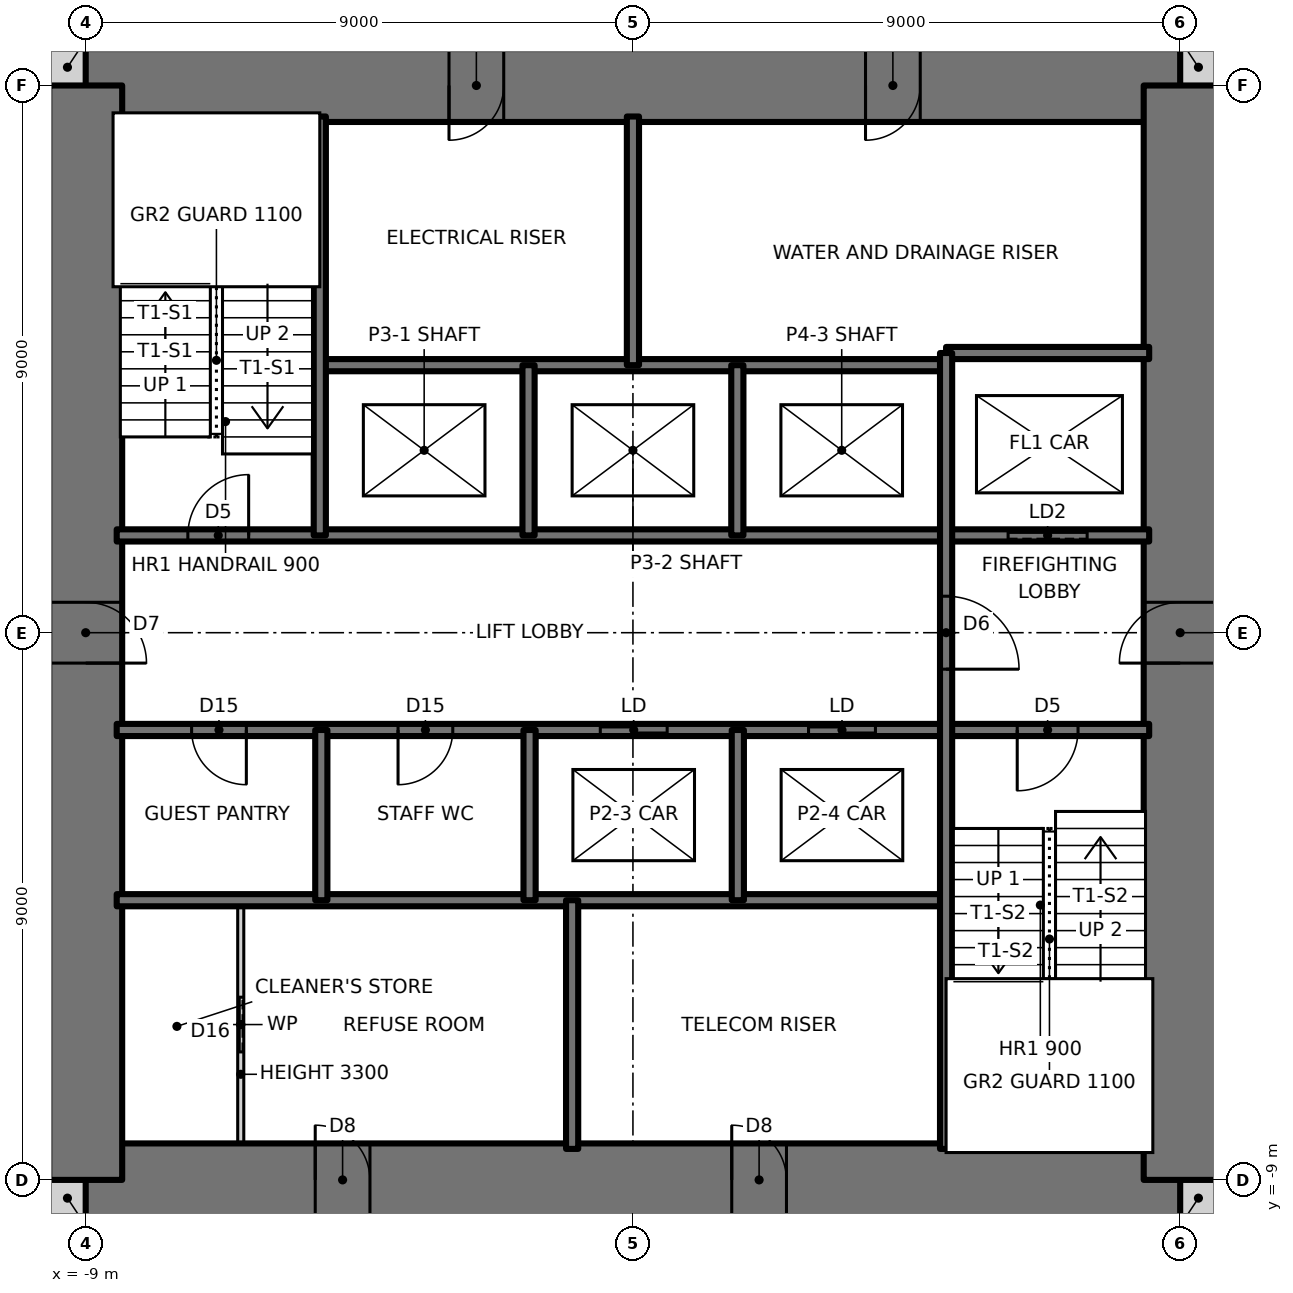
"""IFC4 building model, lengths in metres.
Left out: names, types, materials, properties, quantities, classifications, styles, units other than length and angle.
Written with IfcOpenShell. Run it as: python <this file> out.ifc"""

import sys

from ifc_helpers import new_model, si_unit, direction, frame, frame_2d, origin, place, context, subcontext, project, spatial, rectangle, extrude, element, fill, save


model = new_model("IFC4")
c1 = context("Model", 3, precision=1e-05, world=origin(), true_north=direction((0.0, 1.0)))
c2 = subcontext(c1, "Body", "Model", "MODEL_VIEW")
j1 = project(units=[si_unit("LENGTHUNIT", "METRE"), si_unit("PLANEANGLEUNIT", "RADIAN")], contexts=[c1])
p1 = place(None, origin())
s1 = spatial("IfcSite", under=j1, at=p1, CompositionType="ELEMENT")
p2 = place(p1, origin())
s2 = spatial("IfcBuilding", under=s1, at=p2, CompositionType="ELEMENT")
p3 = place(p2, frame((0.0, 0.0, 133.0)))
s3 = spatial("IfcBuildingStorey", under=s2, at=p3, CompositionType="ELEMENT", Elevation=133.0)
for number, where, z_axis, x_axis in (
    (1, (-9.6, -9.3, 0.0), (0.0, 0.0, 1.0), (1.0, 0.0, 0.0)),
    (2, (9.0, -9.3, 0.0), (0.0, 0.0, 1.0), (1.0, 0.0, 0.0)),
    (3, (9.0, 9.3, 0.0), (0.0, 0.0, 1.0), (1.0, 0.0, 0.0)),
    (4, (-9.6, 9.3, 0.0), (0.0, 0.0, 1.0), (1.0, 0.0, 0.0)),
):
    element("IfcWall", number, at=place(p3, frame(where, z_axis=z_axis, x_axis=x_axis)), inside=s3, PredefinedType="SOLIDWALL", context=c2, shape_type="SweptSolid", body=[
        extrude(rectangle(XDim=0.6, YDim=0.6, at=frame_2d((0.3, 0.0))), origin(), (0.0, 0.0, 1.0), 3.5),
    ])
p4 = place(p3, frame((-9.0, -9.0, 0.0), z_axis=(0.0, 0.0, 1.0), x_axis=(1.0, 0.0, 0.0)))
e5 = element("IfcWall", 5, at=p4, inside=s3, PredefinedType="SHEAR", context=c2, shape_type="SweptSolid", body=[
    extrude(rectangle(XDim=18.0, YDim=1.2, at=frame_2d((9.0, 0.0))), origin(), (0.0, 0.0, 1.0), 3.5),
])
p5 = place(p4, frame((3.775, 0.0, 0.0)))
e6 = element("IfcOpeningElement", 6, at=p5, cuts=e5, PredefinedType="OPENING", context=c2, shape_type="SweptSolid", body=[
    extrude(rectangle(XDim=0.9, YDim=2.1, at=frame_2d((0.45, 1.05))), frame((0.0, 0.61, 0.0), z_axis=(0.0, -1.0, 0.0), x_axis=(1.0, 0.0, 0.0)), (0.0, 0.0, 1.0), 1.22),
])
p6 = place(p4, frame((10.625, 0.0, 0.0)))
e7 = element("IfcOpeningElement", 7, at=p6, cuts=e5, PredefinedType="OPENING", context=c2, shape_type="SweptSolid", body=[
    extrude(rectangle(XDim=0.9, YDim=2.1, at=frame_2d((0.45, 1.05))), frame((0.0, 0.61, 0.0), z_axis=(0.0, -1.0, 0.0), x_axis=(1.0, 0.0, 0.0)), (0.0, 0.0, 1.0), 1.22),
])
p7 = place(p3, frame((9.0, 9.0, 0.0), z_axis=(0.0, 0.0, 1.0), x_axis=(-1.0, 0.0, 0.0)))
e8 = element("IfcWall", 8, at=p7, inside=s3, PredefinedType="SHEAR", context=c2, shape_type="SweptSolid", body=[
    extrude(rectangle(XDim=18.0, YDim=1.2, at=frame_2d((9.0, 0.0))), origin(), (0.0, 0.0, 1.0), 3.5),
])
p8 = place(p7, frame((11.125, 0.0, 0.0)))
e9 = element("IfcOpeningElement", 9, at=p8, cuts=e8, PredefinedType="OPENING", context=c2, shape_type="SweptSolid", body=[
    extrude(rectangle(XDim=0.9, YDim=2.1, at=frame_2d((0.45, 1.05))), frame((0.0, 0.61, 0.0), z_axis=(0.0, -1.0, 0.0), x_axis=(1.0, 0.0, 0.0)), (0.0, 0.0, 1.0), 1.22),
])
p9 = place(p7, frame((4.275, 0.0, 0.0)))
e10 = element("IfcOpeningElement", 10, at=p9, cuts=e8, PredefinedType="OPENING", context=c2, shape_type="SweptSolid", body=[
    extrude(rectangle(XDim=0.9, YDim=2.1, at=frame_2d((0.45, 1.05))), frame((0.0, 0.61, 0.0), z_axis=(0.0, -1.0, 0.0), x_axis=(1.0, 0.0, 0.0)), (0.0, 0.0, 1.0), 1.22),
])
p10 = place(p3, frame((9.0, -9.0, 0.0), z_axis=(0.0, 0.0, 1.0), x_axis=(0.0, 1.0, 0.0)))
e11 = element("IfcWall", 11, at=p10, inside=s3, PredefinedType="SHEAR", context=c2, shape_type="SweptSolid", body=[
    extrude(rectangle(XDim=18.0, YDim=1.2, at=frame_2d((9.0, 0.0))), origin(), (0.0, 0.0, 1.0), 3.5),
])
p11 = place(p10, frame((8.5, 0.0, 0.0)))
e12 = element("IfcOpeningElement", 12, at=p11, cuts=e11, PredefinedType="OPENING", context=c2, shape_type="SweptSolid", body=[
    extrude(rectangle(XDim=1.0, YDim=2.1, at=frame_2d((0.5, 1.05))), frame((0.0, 0.61, 0.0), z_axis=(0.0, -1.0, 0.0), x_axis=(1.0, 0.0, 0.0)), (0.0, 0.0, 1.0), 1.22),
])
p12 = place(p3, frame((-9.0, 9.0, 0.0), z_axis=(0.0, 0.0, 1.0), x_axis=(0.0, -1.0, 0.0)))
e13 = element("IfcWall", 13, at=p12, inside=s3, PredefinedType="SHEAR", context=c2, shape_type="SweptSolid", body=[
    extrude(rectangle(XDim=18.0, YDim=1.2, at=frame_2d((9.0, 0.0))), origin(), (0.0, 0.0, 1.0), 3.5),
])
p13 = place(p12, frame((8.5, 0.0, 0.0)))
e14 = element("IfcOpeningElement", 14, at=p13, cuts=e13, PredefinedType="OPENING", context=c2, shape_type="SweptSolid", body=[
    extrude(rectangle(XDim=1.0, YDim=2.1, at=frame_2d((0.5, 1.05))), frame((0.0, 0.61, 0.0), z_axis=(0.0, -1.0, 0.0), x_axis=(1.0, 0.0, 0.0)), (0.0, 0.0, 1.0), 1.22),
])
p14 = place(p3, frame((-8.49, -4.4, 0.0), z_axis=(0.0, 0.0, 1.0), x_axis=(1.0, 0.0, 0.0)))
e15 = element("IfcWall", 15, at=p14, inside=s3, PredefinedType="SOLIDWALL", context=c2, shape_type="SweptSolid", body=[
    extrude(rectangle(XDim=13.64, YDim=0.2, at=frame_2d((6.82, 0.0))), origin(), (0.0, 0.0, 1.0), 3.5),
])
p15 = place(p3, frame((-8.49, -1.6, 0.0), z_axis=(0.0, 0.0, 1.0), x_axis=(1.0, 0.0, 0.0)))
e16 = element("IfcWall", 16, at=p15, inside=s3, PredefinedType="SOLIDWALL", context=c2, shape_type="SweptSolid", body=[
    extrude(rectangle(XDim=16.98, YDim=0.2, at=frame_2d((8.49, 0.0))), origin(), (0.0, 0.0, 1.0), 3.5),
])
p16 = place(p15, frame((14.81, 0.0, 0.0)))
e17 = element("IfcOpeningElement", 17, at=p16, cuts=e16, PredefinedType="OPENING", context=c2, shape_type="SweptSolid", body=[
    extrude(rectangle(XDim=1.0, YDim=2.1, at=frame_2d((0.5, 1.05))), frame((0.0, 0.11, 0.0), z_axis=(0.0, -1.0, 0.0), x_axis=(1.0, 0.0, 0.0)), (0.0, 0.0, 1.0), 0.22),
])
p17 = place(p15, frame((1.232, 0.0, 0.0)))
e18 = element("IfcOpeningElement", 18, at=p17, cuts=e16, PredefinedType="OPENING", context=c2, shape_type="SweptSolid", body=[
    extrude(rectangle(XDim=0.9, YDim=2.1, at=frame_2d((0.45, 1.05))), frame((0.0, 0.11, 0.0), z_axis=(0.0, -1.0, 0.0), x_axis=(1.0, 0.0, 0.0)), (0.0, 0.0, 1.0), 0.22),
])
p18 = place(p15, frame((4.627, 0.0, 0.0)))
e19 = element("IfcOpeningElement", 19, at=p18, cuts=e16, PredefinedType="OPENING", context=c2, shape_type="SweptSolid", body=[
    extrude(rectangle(XDim=0.9, YDim=2.1, at=frame_2d((0.45, 1.05))), frame((0.0, 0.11, 0.0), z_axis=(0.0, -1.0, 0.0), x_axis=(1.0, 0.0, 0.0)), (0.0, 0.0, 1.0), 0.22),
])
p19 = place(p15, frame((7.953, 0.0, 0.0)))
e20 = element("IfcOpeningElement", 20, at=p19, cuts=e16, PredefinedType="OPENING", context=c2, shape_type="SweptSolid", body=[
    extrude(rectangle(XDim=1.1, YDim=2.1, at=frame_2d((0.55, 1.05))), frame((0.0, 0.11, 0.0), z_axis=(0.0, -1.0, 0.0), x_axis=(1.0, 0.0, 0.0)), (0.0, 0.0, 1.0), 0.22),
])
p20 = place(p15, frame((11.378, 0.0, 0.0)))
e21 = element("IfcOpeningElement", 21, at=p20, cuts=e16, PredefinedType="OPENING", context=c2, shape_type="SweptSolid", body=[
    extrude(rectangle(XDim=1.1, YDim=2.1, at=frame_2d((0.55, 1.05))), frame((0.0, 0.11, 0.0), z_axis=(0.0, -1.0, 0.0), x_axis=(1.0, 0.0, 0.0)), (0.0, 0.0, 1.0), 0.22),
])
p21 = place(p3, frame((-8.49, 1.6, 0.0), z_axis=(0.0, 0.0, 1.0), x_axis=(1.0, 0.0, 0.0)))
e22 = element("IfcWall", 22, at=p21, inside=s3, PredefinedType="SOLIDWALL", context=c2, shape_type="SweptSolid", body=[
    extrude(rectangle(XDim=16.98, YDim=0.2, at=frame_2d((8.49, 0.0))), origin(), (0.0, 0.0, 1.0), 3.5),
])
p22 = place(p21, frame((1.17, 0.0, 0.0)))
e23 = element("IfcOpeningElement", 23, at=p22, cuts=e22, PredefinedType="OPENING", context=c2, shape_type="SweptSolid", body=[
    extrude(rectangle(XDim=1.0, YDim=2.1, at=frame_2d((0.5, 1.05))), frame((0.0, 0.11, 0.0), z_axis=(0.0, -1.0, 0.0), x_axis=(1.0, 0.0, 0.0)), (0.0, 0.0, 1.0), 0.22),
])
p23 = place(p21, frame((14.66, 0.0, 0.0)))
e24 = element("IfcOpeningElement", 24, at=p23, cuts=e22, PredefinedType="OPENING", context=c2, shape_type="SweptSolid", body=[
    extrude(rectangle(XDim=1.3, YDim=2.1, at=frame_2d((0.65, 1.05))), frame((0.0, 0.11, 0.0), z_axis=(0.0, -1.0, 0.0), x_axis=(1.0, 0.0, 0.0)), (0.0, 0.0, 1.0), 0.22),
])
p24 = place(p3, frame((-5.15, 4.4, 0.0), z_axis=(0.0, 0.0, 1.0), x_axis=(1.0, 0.0, 0.0)))
e25 = element("IfcWall", 25, at=p24, inside=s3, PredefinedType="SOLIDWALL", context=c2, shape_type="SweptSolid", body=[
    extrude(rectangle(XDim=10.3, YDim=0.2, at=frame_2d((5.15, 0.0))), origin(), (0.0, 0.0, 1.0), 3.5),
])
p25 = place(p3, frame((5.15, 4.6, 0.0), z_axis=(0.0, 0.0, 1.0), x_axis=(1.0, 0.0, 0.0)))
e26 = element("IfcWall", 26, at=p25, inside=s3, PredefinedType="SOLIDWALL", context=c2, shape_type="SweptSolid", body=[
    extrude(rectangle(XDim=3.34, YDim=0.2, at=frame_2d((1.67, 0.0))), origin(), (0.0, 0.0, 1.0), 3.5),
])
p26 = place(p3, frame((5.15, -8.49, 0.0), z_axis=(0.0, 0.0, 1.0), x_axis=(0.0, 1.0, 0.0)))
e27 = element("IfcWall", 27, at=p26, inside=s3, PredefinedType="SOLIDWALL", context=c2, shape_type="SweptSolid", body=[
    extrude(rectangle(XDim=13.09, YDim=0.2, at=frame_2d((6.545, 0.0))), origin(), (0.0, 0.0, 1.0), 3.5),
])
p27 = place(p26, frame((7.89, 0.0, 0.0)))
e28 = element("IfcOpeningElement", 28, at=p27, cuts=e27, PredefinedType="OPENING", context=c2, shape_type="SweptSolid", body=[
    extrude(rectangle(XDim=1.2, YDim=2.1, at=frame_2d((0.6, 1.05))), frame((0.0, 0.11, 0.0), z_axis=(0.0, -1.0, 0.0), x_axis=(1.0, 0.0, 0.0)), (0.0, 0.0, 1.0), 0.22),
])
for number, where, z_axis, x_axis in (
    (29, (1.725, -4.4, 0.0), (0.0, 0.0, 1.0), (0.0, 1.0, 0.0)),
    (30, (1.717, 1.6, 0.0), (0.0, 0.0, 1.0), (0.0, 1.0, 0.0)),
):
    element("IfcWall", number, at=place(p3, frame(where, z_axis=z_axis, x_axis=x_axis)), inside=s3, PredefinedType="SOLIDWALL", context=c2, shape_type="SweptSolid", body=[
        extrude(rectangle(XDim=2.8, YDim=0.2, at=frame_2d((1.4, 0.0))), origin(), (0.0, 0.0, 1.0), 3.5),
    ])
for number, where, z_axis, x_axis in (
    (31, (0.0, 4.4, 0.0), (0.0, 0.0, 1.0), (0.0, 1.0, 0.0)),
    (32, (-1.0, -8.49, 0.0), (0.0, 0.0, 1.0), (0.0, 1.0, 0.0)),
):
    element("IfcWall", number, at=place(p3, frame(where, z_axis=z_axis, x_axis=x_axis)), inside=s3, PredefinedType="SOLIDWALL", context=c2, shape_type="SweptSolid", body=[
        extrude(rectangle(XDim=4.09, YDim=0.2, at=frame_2d((2.045, 0.0))), origin(), (0.0, 0.0, 1.0), 3.5),
    ])
for number, where, z_axis, x_axis in (
    (33, (-1.7, -4.4, 0.0), (0.0, 0.0, 1.0), (0.0, 1.0, 0.0)),
    (34, (-1.717, 1.6, 0.0), (0.0, 0.0, 1.0), (0.0, 1.0, 0.0)),
    (35, (-5.125, -4.4, 0.0), (0.0, 0.0, 1.0), (0.0, 1.0, 0.0)),
):
    element("IfcWall", number, at=place(p3, frame(where, z_axis=z_axis, x_axis=x_axis)), inside=s3, PredefinedType="SOLIDWALL", context=c2, shape_type="SweptSolid", body=[
        extrude(rectangle(XDim=2.8, YDim=0.2, at=frame_2d((1.4, 0.0))), origin(), (0.0, 0.0, 1.0), 3.5),
    ])
p28 = place(p3, frame((-5.15, 1.6, 0.0), z_axis=(0.0, 0.0, 1.0), x_axis=(0.0, 1.0, 0.0)))
e36 = element("IfcWall", 36, at=p28, inside=s3, PredefinedType="SOLIDWALL", context=c2, shape_type="SweptSolid", body=[
    extrude(rectangle(XDim=6.89, YDim=0.2, at=frame_2d((3.445, 0.0))), origin(), (0.0, 0.0, 1.0), 3.5),
])
p29 = place(p3, frame((-6.45, -8.49, 0.0), z_axis=(0.0, 0.0, 1.0), x_axis=(0.0, 1.0, 0.0)))
e37 = element("IfcWall", 37, at=p29, inside=s3, PredefinedType="PARTITIONING", context=c2, shape_type="SweptSolid", body=[
    extrude(rectangle(XDim=4.09, YDim=0.1, at=frame_2d((2.045, 0.0))), origin(), (0.0, 0.0, 1.0), 3.3),
])
p30 = place(p29, frame((1.595, 0.0, 0.0)))
e38 = element("IfcOpeningElement", 38, at=p30, cuts=e37, PredefinedType="OPENING", context=c2, shape_type="SweptSolid", body=[
    extrude(rectangle(XDim=0.9, YDim=2.1, at=frame_2d((0.45, 1.05))), frame((0.0, 0.06, 0.0), z_axis=(0.0, -1.0, 0.0), x_axis=(1.0, 0.0, 0.0)), (0.0, 0.0, 1.0), 0.12),
])
p31 = place(p22, origin())
e39 = element("IfcDoor", 39, at=p31, inside=s3, OperationType="SINGLE_SWING_RIGHT", PredefinedType="DOOR", context=c2, shape_type="SweptSolid", body=[
    extrude(rectangle(XDim=1.0, YDim=2.1, at=frame_2d((0.5, 1.05))), frame((0.0, 0.025, 0.0), z_axis=(0.0, -1.0, 0.0), x_axis=(1.0, 0.0, 0.0)), (0.0, 0.0, 1.0), 0.05),
])
fill(e23, e39)
p32 = place(p16, frame((1.0, 0.0, 0.0), z_axis=(0.0, 0.0, 1.0), x_axis=(-1.0, 0.0, 0.0)))
e40 = element("IfcDoor", 40, at=p32, inside=s3, OperationType="SINGLE_SWING_RIGHT", PredefinedType="DOOR", context=c2, shape_type="SweptSolid", body=[
    extrude(rectangle(XDim=1.0, YDim=2.1, at=frame_2d((0.5, 1.05))), frame((0.0, 0.025, 0.0), z_axis=(0.0, -1.0, 0.0), x_axis=(1.0, 0.0, 0.0)), (0.0, 0.0, 1.0), 0.05),
])
fill(e17, e40)
p33 = place(p27, frame((1.2, 0.0, 0.0), z_axis=(0.0, 0.0, 1.0), x_axis=(-1.0, 0.0, 0.0)))
e41 = element("IfcDoor", 41, at=p33, inside=s3, OperationType="SINGLE_SWING_RIGHT", PredefinedType="DOOR", context=c2, shape_type="SweptSolid", body=[
    extrude(rectangle(XDim=1.2, YDim=2.1, at=frame_2d((0.6, 1.05))), frame((0.0, 0.025, 0.0), z_axis=(0.0, -1.0, 0.0), x_axis=(1.0, 0.0, 0.0)), (0.0, 0.0, 1.0), 0.05),
])
fill(e28, e41)
p34 = place(p17, frame((0.9, 0.0, 0.0), z_axis=(0.0, 0.0, 1.0), x_axis=(-1.0, 0.0, 0.0)))
e42 = element("IfcDoor", 42, at=p34, inside=s3, OperationType="SINGLE_SWING_LEFT", PredefinedType="DOOR", context=c2, shape_type="SweptSolid", body=[
    extrude(rectangle(XDim=0.9, YDim=2.1, at=frame_2d((0.45, 1.05))), frame((0.0, 0.025, 0.0), z_axis=(0.0, -1.0, 0.0), x_axis=(1.0, 0.0, 0.0)), (0.0, 0.0, 1.0), 0.05),
])
fill(e18, e42)
p35 = place(p18, frame((0.9, 0.0, 0.0), z_axis=(0.0, 0.0, 1.0), x_axis=(-1.0, 0.0, 0.0)))
e43 = element("IfcDoor", 43, at=p35, inside=s3, OperationType="SINGLE_SWING_RIGHT", PredefinedType="DOOR", context=c2, shape_type="SweptSolid", body=[
    extrude(rectangle(XDim=0.9, YDim=2.1, at=frame_2d((0.45, 1.05))), frame((0.0, 0.025, 0.0), z_axis=(0.0, -1.0, 0.0), x_axis=(1.0, 0.0, 0.0)), (0.0, 0.0, 1.0), 0.05),
])
fill(e19, e43)
p36 = place(p30, origin())
e44 = element("IfcDoor", 44, at=p36, inside=s3, OperationType="SLIDING_TO_LEFT", PredefinedType="DOOR", context=c2, shape_type="SweptSolid", body=[
    extrude(rectangle(XDim=0.9, YDim=2.1, at=frame_2d((0.45, 1.05))), frame((0.0, 0.025, 0.0), z_axis=(0.0, -1.0, 0.0), x_axis=(1.0, 0.0, 0.0)), (0.0, 0.0, 1.0), 0.05),
])
fill(e38, e44)
p37 = place(p13, origin())
e45 = element("IfcDoor", 45, at=p37, inside=s3, OperationType="SINGLE_SWING_RIGHT", PredefinedType="DOOR", context=c2, shape_type="SweptSolid", body=[
    extrude(rectangle(XDim=1.0, YDim=2.1, at=frame_2d((0.5, 1.05))), frame((0.0, 0.025, 0.0), z_axis=(0.0, -1.0, 0.0), x_axis=(1.0, 0.0, 0.0)), (0.0, 0.0, 1.0), 0.05),
])
fill(e14, e45)
p38 = place(p11, origin())
e46 = element("IfcDoor", 46, at=p38, inside=s3, OperationType="SINGLE_SWING_LEFT", PredefinedType="DOOR", context=c2, shape_type="SweptSolid", body=[
    extrude(rectangle(XDim=1.0, YDim=2.1, at=frame_2d((0.5, 1.05))), frame((0.0, 0.025, 0.0), z_axis=(0.0, -1.0, 0.0), x_axis=(1.0, 0.0, 0.0)), (0.0, 0.0, 1.0), 0.05),
])
fill(e12, e46)
p39 = place(p8, origin())
e47 = element("IfcDoor", 47, at=p39, inside=s3, OperationType="SINGLE_SWING_RIGHT", PredefinedType="DOOR", context=c2, shape_type="SweptSolid", body=[
    extrude(rectangle(XDim=0.9, YDim=2.1, at=frame_2d((0.45, 1.05))), frame((0.0, 0.025, 0.0), z_axis=(0.0, -1.0, 0.0), x_axis=(1.0, 0.0, 0.0)), (0.0, 0.0, 1.0), 0.05),
])
fill(e9, e47)
p40 = place(p9, origin())
e48 = element("IfcDoor", 48, at=p40, inside=s3, OperationType="SINGLE_SWING_RIGHT", PredefinedType="DOOR", context=c2, shape_type="SweptSolid", body=[
    extrude(rectangle(XDim=0.9, YDim=2.1, at=frame_2d((0.45, 1.05))), frame((0.0, 0.025, 0.0), z_axis=(0.0, -1.0, 0.0), x_axis=(1.0, 0.0, 0.0)), (0.0, 0.0, 1.0), 0.05),
])
fill(e10, e48)
p41 = place(p5, origin())
e49 = element("IfcDoor", 49, at=p41, inside=s3, OperationType="SINGLE_SWING_LEFT", PredefinedType="DOOR", context=c2, shape_type="SweptSolid", body=[
    extrude(rectangle(XDim=0.9, YDim=2.1, at=frame_2d((0.45, 1.05))), frame((0.0, 0.025, 0.0), z_axis=(0.0, -1.0, 0.0), x_axis=(1.0, 0.0, 0.0)), (0.0, 0.0, 1.0), 0.05),
])
fill(e6, e49)
p42 = place(p6, origin())
e50 = element("IfcDoor", 50, at=p42, inside=s3, OperationType="SINGLE_SWING_LEFT", PredefinedType="DOOR", context=c2, shape_type="SweptSolid", body=[
    extrude(rectangle(XDim=0.9, YDim=2.1, at=frame_2d((0.45, 1.05))), frame((0.0, 0.025, 0.0), z_axis=(0.0, -1.0, 0.0), x_axis=(1.0, 0.0, 0.0)), (0.0, 0.0, 1.0), 0.05),
])
fill(e7, e50)
p43 = place(p19, origin())
e51 = element("IfcDoor", 51, at=p43, inside=s3, OperationType="DOUBLE_DOOR_SLIDING", PredefinedType="DOOR", context=c2, shape_type="SweptSolid", body=[
    extrude(rectangle(XDim=1.1, YDim=2.1, at=frame_2d((0.55, 1.05))), frame((0.0, 0.025, 0.0), z_axis=(0.0, -1.0, 0.0), x_axis=(1.0, 0.0, 0.0)), (0.0, 0.0, 1.0), 0.05),
])
fill(e20, e51)
p44 = place(p20, origin())
e52 = element("IfcDoor", 52, at=p44, inside=s3, OperationType="DOUBLE_DOOR_SLIDING", PredefinedType="DOOR", context=c2, shape_type="SweptSolid", body=[
    extrude(rectangle(XDim=1.1, YDim=2.1, at=frame_2d((0.55, 1.05))), frame((0.0, 0.025, 0.0), z_axis=(0.0, -1.0, 0.0), x_axis=(1.0, 0.0, 0.0)), (0.0, 0.0, 1.0), 0.05),
])
fill(e21, e52)
p45 = place(p23, origin())
e53 = element("IfcDoor", 53, at=p45, inside=s3, OperationType="SLIDING_TO_LEFT", PredefinedType="DOOR", context=c2, shape_type="SweptSolid", body=[
    extrude(rectangle(XDim=1.3, YDim=2.1, at=frame_2d((0.65, 1.05))), frame((0.0, 0.025, 0.0), z_axis=(0.0, -1.0, 0.0), x_axis=(1.0, 0.0, 0.0)), (0.0, 0.0, 1.0), 0.05),
])
fill(e24, e53)
save(model, sys.argv[1])
